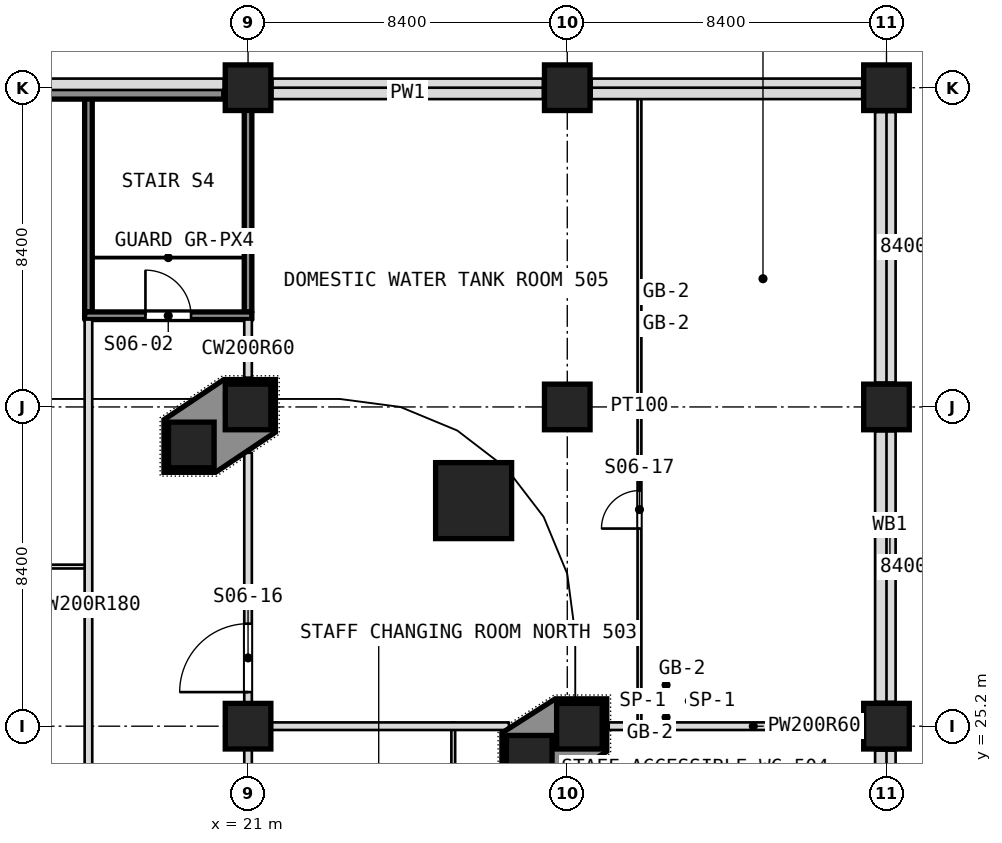
"""IFC4 building model, lengths in metres.
Left out: names, types, materials, properties, quantities, classifications, styles, units other than length and angle.
Written with IfcOpenShell. Run it as: python <this file> out.ifc"""

import sys

from ifc_helpers import new_model, si_unit, direction, frame, frame_2d, origin, origin_2d, place, context, subcontext, project, spatial, polyline, rectangle, outline, extrude, element, fill, save


model = new_model("IFC4")
c1 = context("Model", 3, precision=1e-05, world=origin(), true_north=direction((0.0, 1.0)))
c2 = subcontext(c1, "Body", "Model", "MODEL_VIEW")
j1 = project(units=[si_unit("LENGTHUNIT", "METRE"), si_unit("PLANEANGLEUNIT", "RADIAN")], contexts=[c1])
p1 = place(None, origin())
s1 = spatial("IfcSite", under=j1, at=p1, CompositionType="ELEMENT")
p2 = place(p1, origin())
s2 = spatial("IfcBuilding", under=s1, at=p2, CompositionType="ELEMENT")
p3 = place(p2, frame((0.0, 0.0, 31.0)))
s3 = spatial("IfcBuildingStorey", under=s2, at=p3, CompositionType="ELEMENT", Elevation=31.0)
for number, where, z_axis, x_axis in (
    (1, (21.0, 25.2, 0.0), (0.0, 0.0, 1.0), (1.0, 0.0, 0.0)),
    (2, (29.72, 25.2, 0.0), (0.0, 0.0, 1.0), (1.0, 0.0, 0.0)),
    (3, (37.8, 25.2, 0.0), (0.0, 0.0, 1.0), (1.0, 0.0, 0.0)),
    (4, (21.0, 33.6, 0.0), (0.0, 0.0, 1.0), (1.0, 0.0, 0.0)),
    (5, (29.4, 33.6, 0.0), (0.0, 0.0, 1.0), (1.0, 0.0, 0.0)),
    (6, (37.8, 33.6, 0.0), (0.0, 0.0, 1.0), (1.0, 0.0, 0.0)),
    (7, (21.0, 42.0, 0.0), (0.0, 0.0, 1.0), (1.0, 0.0, 0.0)),
    (8, (29.4, 42.0, 0.0), (0.0, 0.0, 1.0), (1.0, 0.0, 0.0)),
    (9, (37.8, 42.0, 0.0), (0.0, 0.0, 1.0), (1.0, 0.0, 0.0)),
):
    element("IfcColumn", number, at=place(p3, frame(where, z_axis=z_axis, x_axis=x_axis)), inside=s3, PredefinedType="COLUMN", context=c2, shape_type="SweptSolid", body=[
        extrude(rectangle(XDim=1.2, YDim=1.2, at=origin_2d()), origin(), (0.0, 0.0, 1.0), 5.5),
    ])
p4 = place(p3, frame((26.936, 31.135, 0.0), z_axis=(0.0, 0.0, 1.0), x_axis=(1.0, 0.0, 0.0)))
e10 = element("IfcColumn", 10, at=p4, inside=s3, PredefinedType="COLUMN", context=c2, shape_type="SweptSolid", body=[
    extrude(rectangle(XDim=2.0, YDim=2.0, at=origin_2d()), origin(), (0.0, 0.0, 1.0), 5.5),
])
for number, where, z_axis, x_axis in (
    (11, (19.507, 32.6, 0.0), (0.0, 0.0, 1.0), (1.0, 0.0, 0.0)),
    (12, (28.4, 24.356, 0.0), (0.0, 0.0, 1.0), (1.0, 0.0, 0.0)),
):
    element("IfcColumn", number, at=place(p3, frame(where, z_axis=z_axis, x_axis=x_axis)), inside=s3, PredefinedType="COLUMN", context=c2, shape_type="SweptSolid", body=[
        extrude(rectangle(XDim=1.2, YDim=1.2, at=origin_2d()), origin(), (0.0, 0.0, 1.0), 5.5),
    ])
p5 = place(p3, frame((31.3, 25.3, 0.0), z_axis=(0.0, 0.0, 1.0), x_axis=(0.0, 1.0, 0.0)))
e13 = element("IfcWall", 13, at=p5, inside=s3, PredefinedType="PARTITIONING", context=c2, shape_type="SweptSolid", body=[
    extrude(rectangle(XDim=16.64, YDim=0.1, at=frame_2d((8.32, 0.0))), origin(), (0.0, 0.0, 1.0), 5.35),
])
p6 = place(p5, frame((5.1, 0.0, 0.0)))
e14 = element("IfcOpeningElement", 14, at=p6, cuts=e13, PredefinedType="OPENING", context=c2, shape_type="SweptSolid", body=[
    extrude(rectangle(XDim=1.0, YDim=2.1, at=frame_2d((0.5, 1.05))), frame((0.0, 0.05, 0.0), z_axis=(0.0, -1.0, 0.0), x_axis=(1.0, 0.0, 0.0)), (0.0, 0.0, 1.0), 0.1),
])
p7 = place(p3, frame((26.4, 16.9, 0.0), z_axis=(0.0, 0.0, 1.0), x_axis=(0.0, 1.0, 0.0)))
e15 = element("IfcWall", 15, at=p7, inside=s3, PredefinedType="PARTITIONING", context=c2, shape_type="SweptSolid", body=[
    extrude(rectangle(XDim=8.4, YDim=0.1, at=frame_2d((4.2, 0.0))), origin(), (0.0, 0.0, 1.0), 5.35),
])
p8 = place(p7, frame((3.7, 0.0, 0.0)))
e16 = element("IfcOpeningElement", 16, at=p8, cuts=e15, PredefinedType="OPENING", context=c2, shape_type="SweptSolid", body=[
    extrude(rectangle(XDim=1.0, YDim=2.1, at=frame_2d((0.5, 1.05))), frame((0.0, 0.05, 0.0), z_axis=(0.0, -1.0, 0.0), x_axis=(1.0, 0.0, 0.0)), (0.0, 0.0, 1.0), 0.1),
])
p9 = place(p3, frame((21.0, 9.5, 0.0), z_axis=(0.0, 0.0, 1.0), x_axis=(0.0, 1.0, 0.0)))
e17 = element("IfcWall", 17, at=p9, inside=s3, PredefinedType="PARTITIONING", context=c2, shape_type="SweptSolid", body=[
    extrude(rectangle(XDim=22.894, YDim=0.2, at=frame_2d((11.447, 0.0))), origin(), (0.0, 0.0, 1.0), 4.95),
])
p10 = place(p9, frame((3.2, 0.0, 0.0)))
e18 = element("IfcOpeningElement", 18, at=p10, cuts=e17, PredefinedType="OPENING", context=c2, shape_type="SweptSolid", body=[
    extrude(rectangle(XDim=1.0, YDim=2.1, at=frame_2d((0.5, 1.05))), frame((0.0, 0.1, 0.0), z_axis=(0.0, -1.0, 0.0), x_axis=(1.0, 0.0, 0.0)), (0.0, 0.0, 1.0), 0.2),
])
p11 = place(p9, frame((9.9, 0.0, 0.0)))
e19 = element("IfcOpeningElement", 19, at=p11, cuts=e17, PredefinedType="OPENING", context=c2, shape_type="SweptSolid", body=[
    extrude(rectangle(XDim=1.0, YDim=2.1, at=frame_2d((0.5, 1.05))), frame((0.0, 0.1, 0.0), z_axis=(0.0, -1.0, 0.0), x_axis=(1.0, 0.0, 0.0)), (0.0, 0.0, 1.0), 0.2),
])
p12 = place(p9, frame((16.597, 0.0, 0.0)))
e20 = element("IfcOpeningElement", 20, at=p12, cuts=e17, PredefinedType="OPENING", context=c2, shape_type="SweptSolid", body=[
    extrude(rectangle(XDim=1.8, YDim=2.1, at=frame_2d((0.9, 1.05))), frame((0.0, 0.1, 0.0), z_axis=(0.0, -1.0, 0.0), x_axis=(1.0, 0.0, 0.0)), (0.0, 0.0, 1.0), 0.2),
])
p13 = place(p3, frame((21.0, 34.37, 0.0), z_axis=(0.0, 0.0, 1.0), x_axis=(0.0, 1.0, 0.0)))
e21 = element("IfcWall", 21, at=p13, inside=s3, PredefinedType="PARTITIONING", context=c2, shape_type="SweptSolid", body=[
    extrude(rectangle(XDim=1.53, YDim=0.2, at=frame_2d((0.765, 0.0))), origin(), (0.0, 0.0, 1.0), 5.35),
])
p14 = place(p3, frame((21.0, 36.1, 0.0), z_axis=(0.0, 0.0, 1.0), x_axis=(0.0, 1.0, 0.0)))
e22 = element("IfcWall", 22, at=p14, inside=s3, PredefinedType="PARTITIONING", context=c2, shape_type="SweptSolid", body=[
    extrude(rectangle(XDim=6.2, YDim=0.2, at=frame_2d((3.1, 0.0))), origin(), (0.0, 0.0, 1.0), 5.35),
])
p15 = place(p3, frame((16.8, 20.9, 0.0), z_axis=(0.0, 0.0, 1.0), x_axis=(0.0, 1.0, 0.0)))
e23 = element("IfcWall", 23, at=p15, inside=s3, PredefinedType="PARTITIONING", context=c2, shape_type="SweptSolid", body=[
    extrude(rectangle(XDim=15.0, YDim=0.2, at=frame_2d((7.5, 0.0))), origin(), (0.0, 0.0, 1.0), 4.95),
])
p16 = place(p3, frame((16.8, 36.1, 0.0), z_axis=(0.0, 0.0, 1.0), x_axis=(0.0, 1.0, 0.0)))
e24 = element("IfcWall", 24, at=p16, inside=s3, PredefinedType="PARTITIONING", context=c2, shape_type="SweptSolid", body=[
    extrude(rectangle(XDim=5.84, YDim=0.2, at=frame_2d((2.92, 0.0))), origin(), (0.0, 0.0, 1.0), 5.35),
])
p17 = place(p3, frame((21.1, 25.2, 0.0), z_axis=(0.0, 0.0, 1.0), x_axis=(1.0, 0.0, 0.0)))
e25 = element("IfcWall", 25, at=p17, inside=s3, PredefinedType="PARTITIONING", context=c2, shape_type="SweptSolid", body=[
    extrude(rectangle(XDim=6.765, YDim=0.2, at=frame_2d((3.382, 0.0))), origin(), (0.0, 0.0, 1.0), 4.85),
])
p18 = place(p3, frame((30.49, 25.2, 0.0), z_axis=(0.0, 0.0, 1.0), x_axis=(1.0, 0.0, 0.0)))
e26 = element("IfcWall", 26, at=p18, inside=s3, PredefinedType="PARTITIONING", context=c2, shape_type="SweptSolid", body=[
    extrude(rectangle(XDim=7.61, YDim=0.2, at=frame_2d((3.805, 0.0))), origin(), (0.0, 0.0, 1.0), 5.35),
])
p19 = place(p3, frame((4.3, 29.4, 0.0), z_axis=(0.0, 0.0, 1.0), x_axis=(1.0, 0.0, 0.0)))
e27 = element("IfcWall", 27, at=p19, inside=s3, PredefinedType="PARTITIONING", context=c2, shape_type="SweptSolid", body=[
    extrude(rectangle(XDim=12.4, YDim=0.1, at=frame_2d((6.2, 0.0))), origin(), (0.0, 0.0, 1.0), 5.35),
])
p20 = place(p19, frame((5.7, 0.0, 0.0)))
e28 = element("IfcOpeningElement", 28, at=p20, cuts=e27, PredefinedType="OPENING", context=c2, shape_type="SweptSolid", body=[
    extrude(rectangle(XDim=1.0, YDim=2.1, at=frame_2d((0.5, 1.05))), frame((0.0, 0.05, 0.0), z_axis=(0.0, -1.0, 0.0), x_axis=(1.0, 0.0, 0.0)), (0.0, 0.0, 1.0), 0.1),
])
p21 = place(p3, frame((16.7, 36.0, 0.0), z_axis=(0.0, 0.0, 1.0), x_axis=(1.0, 0.0, 0.0)))
e29 = element("IfcWall", 29, at=p21, inside=s3, PredefinedType="PARTITIONING", context=c2, shape_type="SweptSolid", body=[
    extrude(rectangle(XDim=4.4, YDim=0.2, at=frame_2d((2.2, 0.0))), origin(), (0.0, 0.0, 1.0), 5.35),
])
p22 = place(p21, frame((1.6, 0.0, 0.0)))
e30 = element("IfcOpeningElement", 30, at=p22, cuts=e29, PredefinedType="OPENING", context=c2, shape_type="SweptSolid", body=[
    extrude(rectangle(XDim=1.2, YDim=2.1, at=frame_2d((0.6, 1.05))), frame((0.0, 0.1, 0.0), z_axis=(0.0, -1.0, 0.0), x_axis=(1.0, 0.0, 0.0)), (0.0, 0.0, 1.0), 0.2),
])
p23 = place(p3, frame((37.89, 17.44, 0.0), z_axis=(0.0, 0.0, 1.0), x_axis=(0.0, 1.0, 0.0)))
e31 = element("IfcWall", 31, at=p23, inside=s3, PredefinedType="NOTDEFINED", context=c2, shape_type="SweptSolid", body=[
    extrude(rectangle(XDim=7.12, YDim=0.3, at=frame_2d((3.56, 0.0))), origin(), (0.0, 0.0, 1.0), 4.18),
])
p24 = place(p3, frame((37.89, 25.84, 0.0), z_axis=(0.0, 0.0, 1.0), x_axis=(0.0, 1.0, 0.0)))
e32 = element("IfcWall", 32, at=p24, inside=s3, PredefinedType="NOTDEFINED", context=c2, shape_type="SweptSolid", body=[
    extrude(rectangle(XDim=7.12, YDim=0.3, at=frame_2d((3.56, 0.0))), origin(), (0.0, 0.0, 1.0), 4.18),
])
p25 = place(p3, frame((37.89, 34.24, 0.0), z_axis=(0.0, 0.0, 1.0), x_axis=(0.0, 1.0, 0.0)))
e33 = element("IfcWall", 33, at=p25, inside=s3, PredefinedType="NOTDEFINED", context=c2, shape_type="SweptSolid", body=[
    extrude(rectangle(XDim=7.12, YDim=0.3, at=frame_2d((3.56, 0.0))), origin(), (0.0, 0.0, 1.0), 4.18),
])
p26 = place(p3, frame((37.16, 42.09, 0.0), z_axis=(0.0, 0.0, 1.0), x_axis=(-1.0, 0.0, 0.0)))
e34 = element("IfcWall", 34, at=p26, inside=s3, PredefinedType="NOTDEFINED", context=c2, shape_type="SweptSolid", body=[
    extrude(rectangle(XDim=7.12, YDim=0.3, at=frame_2d((3.56, 0.0))), origin(), (0.0, 0.0, 1.0), 4.18),
])
for number, where, z_axis, x_axis in (
    (35, (28.76, 42.09, 0.0), (0.0, 0.0, 1.0), (-1.0, 0.0, 0.0)),
    (36, (20.36, 42.09, 0.0), (0.0, 0.0, 1.0), (-1.0, 0.0, 0.0)),
):
    element("IfcWall", number, at=place(p3, frame(where, z_axis=z_axis, x_axis=x_axis)), inside=s3, PredefinedType="NOTDEFINED", context=c2, shape_type="SweptSolid", body=[
        extrude(rectangle(XDim=7.12, YDim=0.3, at=frame_2d((3.56, 0.0))), origin(), (0.0, 0.0, 1.0), 4.18),
    ])
for number, where, z_axis, x_axis in (
    (37, (13.24, 41.85, 5.5), (0.0, 0.0, 1.0), (1.0, 0.0, 0.0)),
    (38, (21.64, 41.85, 5.5), (0.0, 0.0, 1.0), (1.0, 0.0, 0.0)),
):
    element("IfcWall", number, at=place(p3, frame(where, z_axis=z_axis, x_axis=x_axis)), inside=s3, PredefinedType="PARAPET", context=c2, shape_type="SweptSolid", body=[
        extrude(rectangle(XDim=7.12, YDim=0.3, at=frame_2d((3.56, 0.0))), origin(), (0.0, 0.0, 1.0), 1.1),
    ])
p27 = place(p3, frame((30.04, 41.85, 5.5), z_axis=(0.0, 0.0, 1.0), x_axis=(1.0, 0.0, 0.0)))
e39 = element("IfcWall", 39, at=p27, inside=s3, PredefinedType="PARAPET", context=c2, shape_type="SweptSolid", body=[
    extrude(rectangle(XDim=7.12, YDim=0.3, at=frame_2d((3.56, 0.0))), origin(), (0.0, 0.0, 1.0), 1.1),
])
p28 = place(p3, frame((37.65, 41.36, 5.5), z_axis=(0.0, 0.0, 1.0), x_axis=(0.0, -1.0, 0.0)))
e40 = element("IfcWall", 40, at=p28, inside=s3, PredefinedType="PARAPET", context=c2, shape_type="SweptSolid", body=[
    extrude(rectangle(XDim=7.12, YDim=0.3, at=frame_2d((3.56, 0.0))), origin(), (0.0, 0.0, 1.0), 1.1),
])
p29 = place(p3, frame((37.65, 32.96, 5.5), z_axis=(0.0, 0.0, 1.0), x_axis=(0.0, -1.0, 0.0)))
e41 = element("IfcWall", 41, at=p29, inside=s3, PredefinedType="PARAPET", context=c2, shape_type="SweptSolid", body=[
    extrude(rectangle(XDim=7.12, YDim=0.3, at=frame_2d((3.56, 0.0))), origin(), (0.0, 0.0, 1.0), 1.1),
])
p30 = place(p3, frame((37.65, 24.56, 5.5), z_axis=(0.0, 0.0, 1.0), x_axis=(0.0, -1.0, 0.0)))
e42 = element("IfcWall", 42, at=p30, inside=s3, PredefinedType="PARAPET", context=c2, shape_type="SweptSolid", body=[
    extrude(rectangle(XDim=7.12, YDim=0.3, at=frame_2d((3.56, 0.0))), origin(), (0.0, 0.0, 1.0), 1.1),
])
p31 = place(p3, origin())
e43 = element("IfcWall", 43, at=p31, inside=s3, PredefinedType="SOLIDWALL", context=c2, shape_type="SweptSolid", body=[
    extrude(outline(polyline([(20.364, 34.32), (21.72, 34.32), (21.72, 32.936), (20.143, 31.88), (18.787, 31.88), (18.787, 33.264), (20.364, 34.32)]), holes=[polyline([(21.6, 33.0), (21.6, 34.2), (20.4, 34.2), (20.4, 33.0), (21.6, 33.0)]), polyline([(20.107, 32.0), (20.107, 33.2), (18.907, 33.2), (18.907, 32.0), (20.107, 32.0)])]), origin(), (0.0, 0.0, 1.0), 5.5),
])
p32 = place(p3, origin())
e44 = element("IfcWall", 44, at=p32, inside=s3, PredefinedType="SOLIDWALL", context=c2, shape_type="SweptSolid", body=[
    extrude(outline(polyline([(27.68, 25.022), (29.085, 25.92), (30.44, 25.92), (30.44, 24.534), (29.035, 23.636), (27.68, 23.636), (27.68, 25.022)]), holes=[polyline([(29.12, 24.6), (30.32, 24.6), (30.32, 25.8), (29.12, 25.8), (29.12, 24.6)]), polyline([(27.8, 23.756), (29.0, 23.756), (29.0, 24.956), (27.8, 24.956), (27.8, 23.756)])]), origin(), (0.0, 0.0, 1.0), 5.5),
])
p33 = place(p22, origin())
e45 = element("IfcDoor", 45, at=p33, inside=s3, OperationType="SINGLE_SWING_LEFT", PredefinedType="DOOR", context=c2, shape_type="SweptSolid", body=[
    extrude(rectangle(XDim=1.2, YDim=2.1, at=frame_2d((0.6, 1.05))), frame((0.0, 0.025, 0.0), z_axis=(0.0, -1.0, 0.0), x_axis=(1.0, 0.0, 0.0)), (0.0, 0.0, 1.0), 0.05),
])
fill(e30, e45)
p34 = place(p12, origin())
e46 = element("IfcDoor", 46, at=p34, inside=s3, OperationType="DOUBLE_DOOR_SINGLE_SWING", PredefinedType="DOOR", context=c2, shape_type="SweptSolid", body=[
    extrude(rectangle(XDim=1.8, YDim=2.1, at=frame_2d((0.9, 1.05))), frame((0.0, 0.025, 0.0), z_axis=(0.0, -1.0, 0.0), x_axis=(1.0, 0.0, 0.0)), (0.0, 0.0, 1.0), 0.05),
])
fill(e20, e46)
p35 = place(p6, origin())
e47 = element("IfcDoor", 47, at=p35, inside=s3, OperationType="SINGLE_SWING_LEFT", PredefinedType="DOOR", context=c2, shape_type="SweptSolid", body=[
    extrude(rectangle(XDim=1.0, YDim=2.1, at=frame_2d((0.5, 1.05))), frame((0.0, 0.025, 0.0), z_axis=(0.0, -1.0, 0.0), x_axis=(1.0, 0.0, 0.0)), (0.0, 0.0, 1.0), 0.05),
])
fill(e14, e47)
save(model, sys.argv[1])
